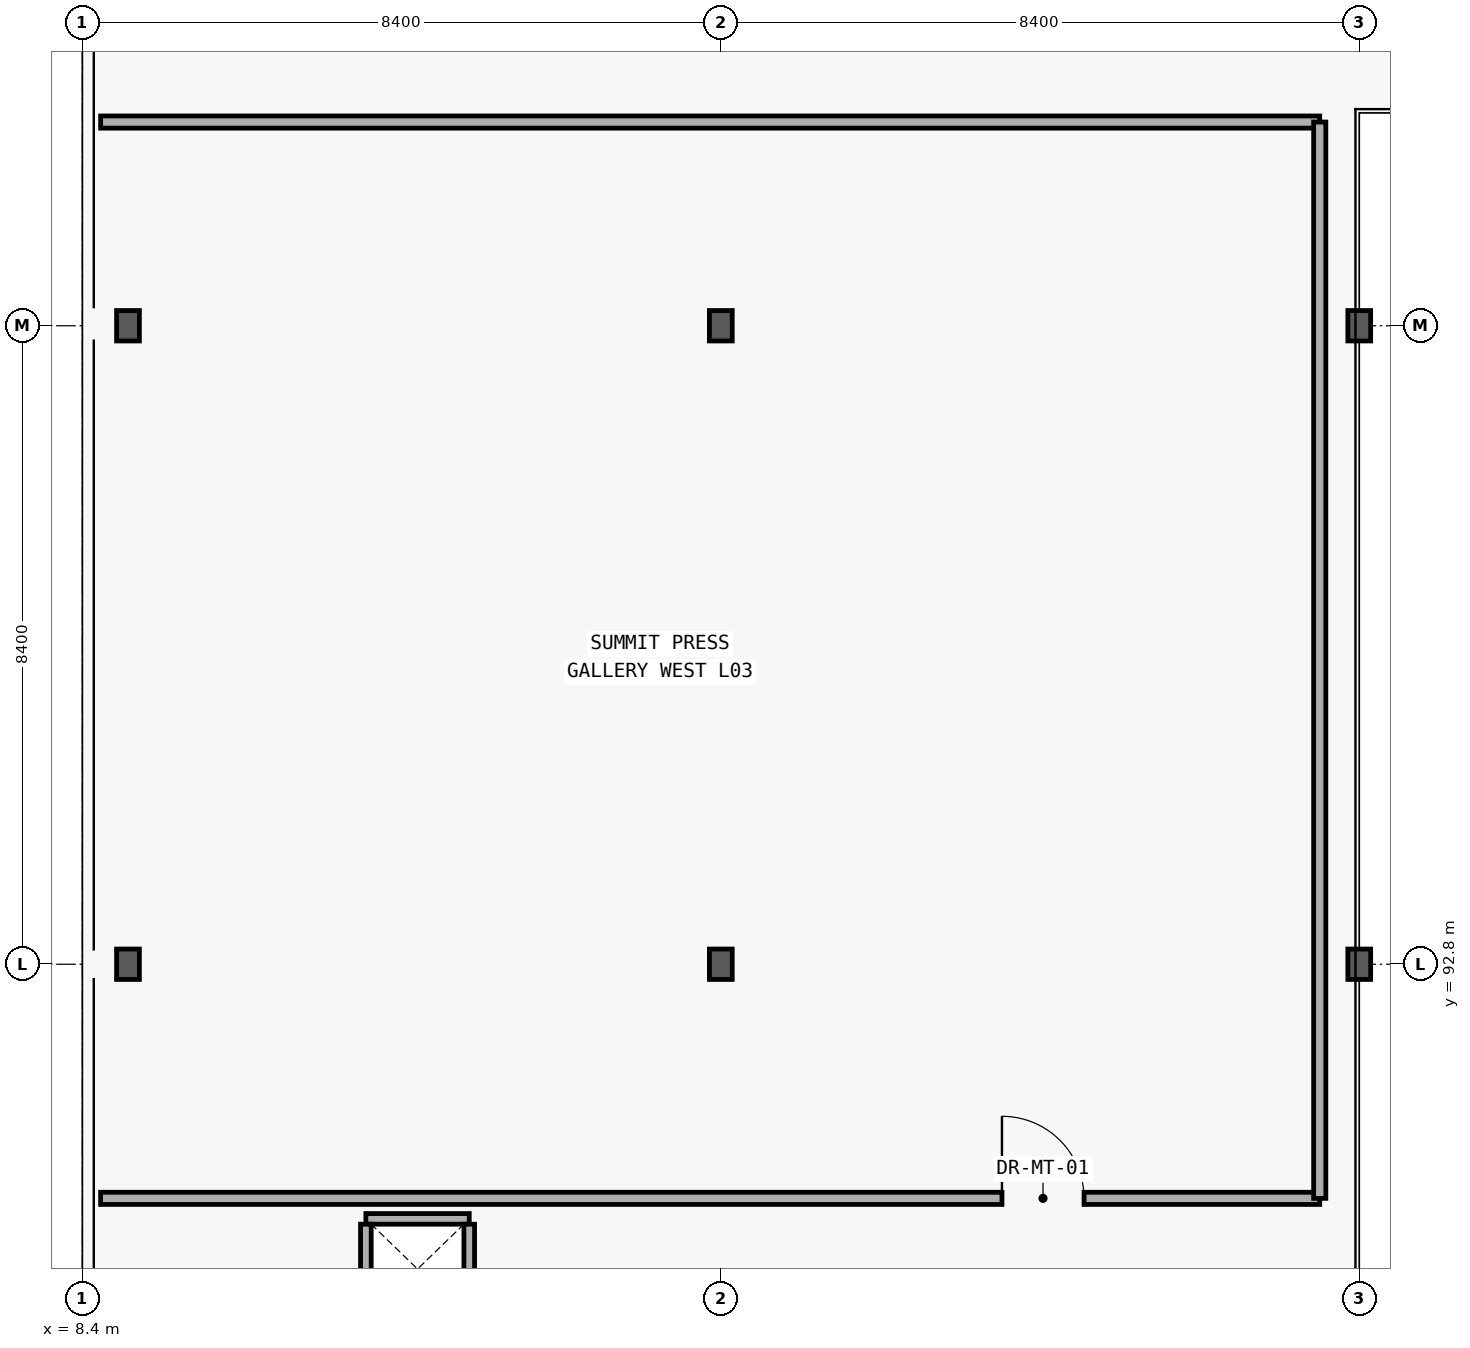
"""IFC4 building model, lengths in metres.
Left out: names, types, materials, properties, quantities, classifications, styles, units other than length and angle.
Written with IfcOpenShell. Run it as: python <this file> out.ifc"""

import sys

from ifc_helpers import new_model, si_unit, direction, frame, frame_2d, origin, origin_2d, place, context, subcontext, project, spatial, rectangle, i_section, extrude, element, fill, save


model = new_model("IFC4")
c1 = context("Model", 3, precision=1e-05, world=origin(), true_north=direction((0.0, 1.0)))
c2 = subcontext(c1, "Body", "Model", "MODEL_VIEW")
j1 = project(units=[si_unit("LENGTHUNIT", "METRE"), si_unit("PLANEANGLEUNIT", "RADIAN")], contexts=[c1])
p1 = place(None, origin())
s1 = spatial("IfcSite", under=j1, at=p1, CompositionType="ELEMENT")
p2 = place(p1, origin())
s2 = spatial("IfcBuilding", under=s1, at=p2, CompositionType="ELEMENT")
p3 = place(p2, frame((0.0, 0.0, 15.0)))
s3 = spatial("IfcBuildingStorey", under=s2, at=p3, CompositionType="ELEMENT", Elevation=15.0)
for number, where, z_axis, x_axis in (
    (1, (9.0, 92.8, 0.0), (0.0, 0.0, 1.0), (1.0, 0.0, 0.0)),
    (2, (9.0, 101.2, 0.0), (0.0, 0.0, 1.0), (1.0, 0.0, 0.0)),
    (3, (16.8, 92.8, 0.0), (0.0, 0.0, 1.0), (1.0, 0.0, 0.0)),
    (4, (16.8, 101.2, 0.0), (0.0, 0.0, 1.0), (1.0, 0.0, 0.0)),
    (5, (25.2, 92.8, 0.0), (0.0, 0.0, 1.0), (1.0, 0.0, 0.0)),
    (6, (25.2, 101.2, 0.0), (0.0, 0.0, 1.0), (1.0, 0.0, 0.0)),
):
    element("IfcColumn", number, at=place(p3, frame(where, z_axis=z_axis, x_axis=x_axis)), inside=s3, PredefinedType="COLUMN", context=c2, shape_type="SweptSolid", body=[
        extrude(i_section(OverallWidth=0.3, OverallDepth=0.4, WebThickness=0.013, FlangeThickness=0.024, at=origin_2d()), origin(), (0.0, 0.0, 1.0), 4.2),
    ])
p4 = place(p3, frame((8.64, 89.72, 0.0), z_axis=(0.0, 0.0, 1.0), x_axis=(1.0, 0.0, 0.0)))
e7 = element("IfcWall", 7, at=p4, inside=s3, PredefinedType="PARTITIONING", context=c2, shape_type="SweptSolid", body=[
    extrude(rectangle(XDim=16.04, YDim=0.16, at=frame_2d((8.02, 0.0))), origin(), (0.0, 0.0, 1.0), 3.02),
])
p5 = place(p4, frame((11.859, 0.0, 0.0)))
e8 = element("IfcOpeningElement", 8, at=p5, cuts=e7, PredefinedType="OPENING", context=c2, shape_type="SweptSolid", body=[
    extrude(rectangle(XDim=1.08, YDim=2.25, at=frame_2d((0.54, 1.125))), frame((0.0, 0.09, 0.0), z_axis=(0.0, -1.0, 0.0), x_axis=(1.0, 0.0, 0.0)), (0.0, 0.0, 1.0), 0.18),
])
p6 = place(p3, frame((8.64, 103.88, 0.0), z_axis=(0.0, 0.0, 1.0), x_axis=(1.0, 0.0, 0.0)))
e9 = element("IfcWall", 9, at=p6, inside=s3, PredefinedType="PARTITIONING", context=c2, shape_type="SweptSolid", body=[
    extrude(rectangle(XDim=16.04, YDim=0.16, at=frame_2d((8.02, 0.0))), origin(), (0.0, 0.0, 1.0), 3.02),
])
p7 = place(p3, frame((24.68, 89.72, 0.0), z_axis=(0.0, 0.0, 1.0), x_axis=(0.0, 1.0, 0.0)))
e10 = element("IfcWall", 10, at=p7, inside=s3, PredefinedType="PARTITIONING", context=c2, shape_type="SweptSolid", body=[
    extrude(rectangle(XDim=14.16, YDim=0.16, at=frame_2d((7.08, 0.0))), origin(), (0.0, 0.0, 1.0), 3.02),
])
p8 = place(p3, frame((13.49, 89.45, 0.0), z_axis=(0.0, 0.0, 1.0), x_axis=(-1.0, 0.0, 0.0)))
e11 = element("IfcWall", 11, at=p8, inside=s3, PredefinedType="PARTITIONING", context=c2, shape_type="SweptSolid", body=[
    extrude(rectangle(XDim=1.36, YDim=0.14, at=frame_2d((0.68, 0.0))), origin(), (0.0, 0.0, 1.0), 3.04),
])
for number, where, z_axis, x_axis in (
    (12, (12.13, 89.38, 0.0), (0.0, 0.0, 1.0), (0.0, -1.0, 0.0)),
    (13, (13.49, 88.2, 0.0), (0.0, 0.0, 1.0), (0.0, 1.0, 0.0)),
):
    element("IfcWall", number, at=place(p3, frame(where, z_axis=z_axis, x_axis=x_axis)), inside=s3, PredefinedType="PARTITIONING", context=c2, shape_type="SweptSolid", body=[
        extrude(rectangle(XDim=1.18, YDim=0.14, at=frame_2d((0.59, 0.0))), origin(), (0.0, 0.0, 1.0), 3.04),
    ])
p9 = place(p5, origin())
e14 = element("IfcDoor", 14, at=p9, inside=s3, OperationType="SINGLE_SWING_LEFT", PredefinedType="DOOR", context=c2, shape_type="SweptSolid", body=[
    extrude(rectangle(XDim=1.08, YDim=2.25, at=frame_2d((0.54, 1.125))), frame((0.0, 0.025, 0.0), z_axis=(0.0, -1.0, 0.0), x_axis=(1.0, 0.0, 0.0)), (0.0, 0.0, 1.0), 0.05),
])
fill(e8, e14)
save(model, sys.argv[1])
